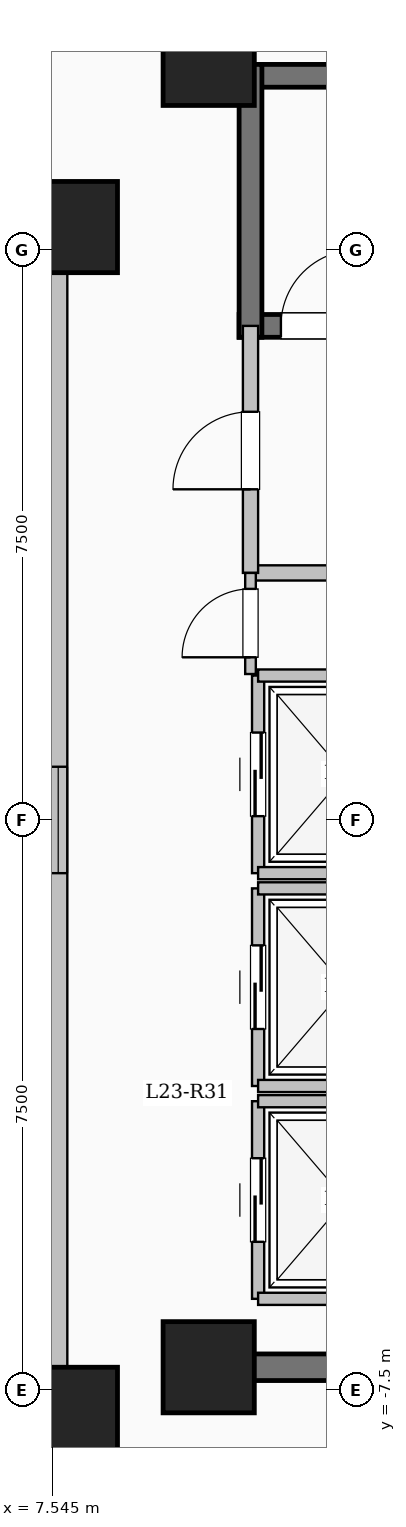
"""IFC4 building model, lengths in metres.
Left out: names, types, materials, properties, quantities, classifications, styles, units other than length and angle.
Written with IfcOpenShell. Run it as: python <this file> out.ifc"""

import sys

from ifc_helpers import new_model, si_unit, direction, frame, frame_2d, origin, origin_2d, place, context, subcontext, project, spatial, rectangle, extrude, element, fill, save


model = new_model("IFC4")
c1 = context("Model", 3, precision=1e-05, world=origin(), true_north=direction((0.0, 1.0)))
c2 = subcontext(c1, "Body", "Model", "MODEL_VIEW")
j1 = project(units=[si_unit("LENGTHUNIT", "METRE"), si_unit("PLANEANGLEUNIT", "RADIAN")], contexts=[c1])
p1 = place(None, origin())
s1 = spatial("IfcSite", under=j1, at=p1, CompositionType="ELEMENT")
p2 = place(p1, origin())
s2 = spatial("IfcBuilding", under=s1, at=p2, CompositionType="ELEMENT")
p3 = place(p2, frame((0.0, 0.0, 88.35)))
s3 = spatial("IfcBuildingStorey", under=s2, at=p3, CompositionType="ELEMENT", Elevation=88.35)
for number, where, z_axis, x_axis in (
    (1, (7.8, -7.8, 0.0), (0.0, 0.0, 1.0), (1.0, 0.0, 0.0)),
    (2, (7.8, 7.8, 0.0), (0.0, 0.0, 1.0), (1.0, 0.0, 0.0)),
    (3, (9.6, -7.2, 0.0), (0.0, 0.0, 1.0), (1.0, 0.0, 0.0)),
    (4, (9.6, 10.0, 0.0), (0.0, 0.0, 1.0), (1.0, 0.0, 0.0)),
):
    element("IfcColumn", number, at=place(p3, frame(where, z_axis=z_axis, x_axis=x_axis)), inside=s3, PredefinedType="COLUMN", context=c2, shape_type="SweptSolid", body=[
        extrude(rectangle(XDim=1.2, YDim=1.2, at=origin_2d()), origin(), (0.0, 0.0, 1.0), 3.35),
    ])
p4 = place(p3, frame((-7.62, -7.62, 0.0), z_axis=(0.0, 0.0, 1.0), x_axis=(1.0, 0.0, 0.0)))
e5 = element("IfcWall", 5, at=p4, inside=s3, PredefinedType="SOLIDWALL", context=c2, shape_type="SweptSolid", body=[
    extrude(rectangle(XDim=15.24, YDim=0.24, at=frame_2d((7.62, 0.0))), origin(), (0.0, 0.0, 1.0), 3.1),
])
p5 = place(p4, frame((6.92, 0.0, 0.95)))
e6 = element("IfcOpeningElement", 6, at=p5, cuts=e5, PredefinedType="OPENING", context=c2, shape_type="SweptSolid", body=[
    extrude(rectangle(XDim=1.4, YDim=1.5, at=frame_2d((0.7, 0.75))), frame((0.0, 0.13, 0.0), z_axis=(0.0, -1.0, 0.0), x_axis=(1.0, 0.0, 0.0)), (0.0, 0.0, 1.0), 0.26),
])
p6 = place(p3, frame((7.62, -7.62, 0.0), z_axis=(0.0, 0.0, 1.0), x_axis=(0.0, 1.0, 0.0)))
e7 = element("IfcWall", 7, at=p6, inside=s3, PredefinedType="SOLIDWALL", context=c2, shape_type="SweptSolid", body=[
    extrude(rectangle(XDim=15.24, YDim=0.24, at=frame_2d((7.62, 0.0))), origin(), (0.0, 0.0, 1.0), 3.1),
])
p7 = place(p6, frame((6.92, 0.0, 0.95)))
e8 = element("IfcOpeningElement", 8, at=p7, cuts=e7, PredefinedType="OPENING", context=c2, shape_type="SweptSolid", body=[
    extrude(rectangle(XDim=1.4, YDim=1.5, at=frame_2d((0.7, 0.75))), frame((0.0, 0.13, 0.0), z_axis=(0.0, -1.0, 0.0), x_axis=(1.0, 0.0, 0.0)), (0.0, 0.0, 1.0), 0.26),
])
p8 = place(p3, frame((7.62, 7.62, 0.0), z_axis=(0.0, 0.0, 1.0), x_axis=(-1.0, 0.0, 0.0)))
e9 = element("IfcWall", 9, at=p8, inside=s3, PredefinedType="SOLIDWALL", context=c2, shape_type="SweptSolid", body=[
    extrude(rectangle(XDim=15.24, YDim=0.24, at=frame_2d((7.62, 0.0))), origin(), (0.0, 0.0, 1.0), 3.1),
])
p9 = place(p8, frame((6.92, 0.0, 0.95)))
e10 = element("IfcOpeningElement", 10, at=p9, cuts=e9, PredefinedType="OPENING", context=c2, shape_type="SweptSolid", body=[
    extrude(rectangle(XDim=1.4, YDim=1.5, at=frame_2d((0.7, 0.75))), frame((0.0, 0.13, 0.0), z_axis=(0.0, -1.0, 0.0), x_axis=(1.0, 0.0, 0.0)), (0.0, 0.0, 1.0), 0.26),
])
p10 = place(p3, frame((10.0, 9.79, 0.0), z_axis=(0.0, 0.0, 1.0), x_axis=(1.0, 0.0, 0.0)))
e11 = element("IfcWall", 11, at=p10, inside=s3, PredefinedType="SHEAR", context=c2, shape_type="SweptSolid", body=[
    extrude(rectangle(XDim=8.0, YDim=0.3, at=frame_2d((4.0, 0.0))), origin(), (0.0, 0.0, 1.0), 3.35),
])
p11 = place(p3, frame((10.0, 6.5, 0.0), z_axis=(0.0, 0.0, 1.0), x_axis=(1.0, 0.0, 0.0)))
e12 = element("IfcWall", 12, at=p11, inside=s3, PredefinedType="SHEAR", context=c2, shape_type="SweptSolid", body=[
    extrude(rectangle(XDim=8.0, YDim=0.3, at=frame_2d((4.0, 0.0))), origin(), (0.0, 0.0, 1.0), 3.35),
])
p12 = place(p11, frame((0.55, 0.0, 0.0)))
e13 = element("IfcOpeningElement", 13, at=p12, cuts=e12, PredefinedType="OPENING", context=c2, shape_type="SweptSolid", body=[
    extrude(rectangle(XDim=1.0, YDim=2.15, at=frame_2d((0.5, 1.075))), frame((0.0, 0.16, 0.0), z_axis=(0.0, -1.0, 0.0), x_axis=(1.0, 0.0, 0.0)), (0.0, 0.0, 1.0), 0.32),
])
p13 = place(p3, frame((10.15, 6.35, 0.0), z_axis=(0.0, 0.0, 1.0), x_axis=(0.0, 1.0, 0.0)))
e14 = element("IfcWall", 14, at=p13, inside=s3, PredefinedType="SHEAR", context=c2, shape_type="SweptSolid", body=[
    extrude(rectangle(XDim=3.59, YDim=0.3, at=frame_2d((1.795, 0.0))), origin(), (0.0, 0.0, 1.0), 3.35),
])
p14 = place(p3, frame((10.15, 3.25, 0.0), z_axis=(0.0, 0.0, 1.0), x_axis=(1.0, 0.0, 0.0)))
e15 = element("IfcWall", 15, at=p14, inside=s3, PredefinedType="SOLIDWALL", context=c2, shape_type="SweptSolid", body=[
    extrude(rectangle(XDim=5.4, YDim=0.2, at=frame_2d((2.7, 0.0))), origin(), (0.0, 0.0, 1.0), 3.1),
])
p15 = place(p3, frame((10.15, 3.25, 0.0), z_axis=(0.0, 0.0, 1.0), x_axis=(0.0, 1.0, 0.0)))
e16 = element("IfcWall", 16, at=p15, inside=s3, PredefinedType="SOLIDWALL", context=c2, shape_type="SweptSolid", body=[
    extrude(rectangle(XDim=3.25, YDim=0.2, at=frame_2d((1.625, 0.0))), origin(), (0.0, 0.0, 1.0), 3.1),
])
p16 = place(p15, frame((1.1, 0.0, 0.0)))
e17 = element("IfcOpeningElement", 17, at=p16, cuts=e16, PredefinedType="OPENING", context=c2, shape_type="SweptSolid", body=[
    extrude(rectangle(XDim=1.02, YDim=2.15, at=frame_2d((0.51, 1.075))), frame((0.0, 0.11, 0.0), z_axis=(0.0, -1.0, 0.0), x_axis=(1.0, 0.0, 0.0)), (0.0, 0.0, 1.0), 0.22),
])
p17 = place(p3, frame((10.25, -6.3, 0.0), z_axis=(0.0, 0.0, 1.0), x_axis=(0.0, 1.0, 0.0)))
e18 = element("IfcWall", 18, at=p17, inside=s3, PredefinedType="SOLIDWALL", context=c2, shape_type="SweptSolid", body=[
    extrude(rectangle(XDim=2.6, YDim=0.16, at=frame_2d((1.3, 0.0))), origin(), (0.0, 0.0, 1.0), 3.1),
])
p18 = place(p17, frame((0.75, 0.0, 0.0)))
e19 = element("IfcOpeningElement", 19, at=p18, cuts=e18, PredefinedType="OPENING", context=c2, shape_type="SweptSolid", body=[
    extrude(rectangle(XDim=1.1, YDim=2.15, at=frame_2d((0.55, 1.075))), frame((0.0, 0.09, 0.0), z_axis=(0.0, -1.0, 0.0), x_axis=(1.0, 0.0, 0.0)), (0.0, 0.0, 1.0), 0.18),
])
for number, where, z_axis, x_axis in (
    (20, (10.25, -6.3, 0.0), (0.0, 0.0, 1.0), (1.0, 0.0, 0.0)),
    (21, (10.25, -3.7, 0.0), (0.0, 0.0, 1.0), (1.0, 0.0, 0.0)),
):
    element("IfcWall", number, at=place(p3, frame(where, z_axis=z_axis, x_axis=x_axis)), inside=s3, PredefinedType="SOLIDWALL", context=c2, shape_type="SweptSolid", body=[
        extrude(rectangle(XDim=2.3, YDim=0.16, at=frame_2d((1.15, 0.0))), origin(), (0.0, 0.0, 1.0), 3.1),
    ])
p19 = place(p3, frame((10.25, -3.5, 0.0), z_axis=(0.0, 0.0, 1.0), x_axis=(0.0, 1.0, 0.0)))
e22 = element("IfcWall", 22, at=p19, inside=s3, PredefinedType="SOLIDWALL", context=c2, shape_type="SweptSolid", body=[
    extrude(rectangle(XDim=2.6, YDim=0.16, at=frame_2d((1.3, 0.0))), origin(), (0.0, 0.0, 1.0), 3.1),
])
p20 = place(p19, frame((0.75, 0.0, 0.0)))
e23 = element("IfcOpeningElement", 23, at=p20, cuts=e22, PredefinedType="OPENING", context=c2, shape_type="SweptSolid", body=[
    extrude(rectangle(XDim=1.1, YDim=2.15, at=frame_2d((0.55, 1.075))), frame((0.0, 0.09, 0.0), z_axis=(0.0, -1.0, 0.0), x_axis=(1.0, 0.0, 0.0)), (0.0, 0.0, 1.0), 0.18),
])
for number, where, z_axis, x_axis in (
    (24, (10.25, -3.5, 0.0), (0.0, 0.0, 1.0), (1.0, 0.0, 0.0)),
    (25, (10.25, -0.9, 0.0), (0.0, 0.0, 1.0), (1.0, 0.0, 0.0)),
):
    element("IfcWall", number, at=place(p3, frame(where, z_axis=z_axis, x_axis=x_axis)), inside=s3, PredefinedType="SOLIDWALL", context=c2, shape_type="SweptSolid", body=[
        extrude(rectangle(XDim=2.3, YDim=0.16, at=frame_2d((1.15, 0.0))), origin(), (0.0, 0.0, 1.0), 3.1),
    ])
p21 = place(p3, frame((10.25, -0.7, 0.0), z_axis=(0.0, 0.0, 1.0), x_axis=(0.0, 1.0, 0.0)))
e26 = element("IfcWall", 26, at=p21, inside=s3, PredefinedType="SOLIDWALL", context=c2, shape_type="SweptSolid", body=[
    extrude(rectangle(XDim=2.6, YDim=0.16, at=frame_2d((1.3, 0.0))), origin(), (0.0, 0.0, 1.0), 3.1),
])
p22 = place(p21, frame((0.75, 0.0, 0.0)))
e27 = element("IfcOpeningElement", 27, at=p22, cuts=e26, PredefinedType="OPENING", context=c2, shape_type="SweptSolid", body=[
    extrude(rectangle(XDim=1.1, YDim=2.15, at=frame_2d((0.55, 1.075))), frame((0.0, 0.09, 0.0), z_axis=(0.0, -1.0, 0.0), x_axis=(1.0, 0.0, 0.0)), (0.0, 0.0, 1.0), 0.18),
])
for number, where, z_axis, x_axis in (
    (28, (10.25, -0.7, 0.0), (0.0, 0.0, 1.0), (1.0, 0.0, 0.0)),
    (29, (10.25, 1.9, 0.0), (0.0, 0.0, 1.0), (1.0, 0.0, 0.0)),
):
    element("IfcWall", number, at=place(p3, frame(where, z_axis=z_axis, x_axis=x_axis)), inside=s3, PredefinedType="SOLIDWALL", context=c2, shape_type="SweptSolid", body=[
        extrude(rectangle(XDim=2.3, YDim=0.16, at=frame_2d((1.15, 0.0))), origin(), (0.0, 0.0, 1.0), 3.1),
    ])
p23 = place(p3, frame((10.075, -7.2, 0.0), z_axis=(0.0, 0.0, 1.0), x_axis=(1.0, 0.0, 0.0)))
e30 = element("IfcWall", 30, at=p23, inside=s3, PredefinedType="SHEAR", context=c2, shape_type="SweptSolid", body=[
    extrude(rectangle(XDim=8.55, YDim=0.35, at=frame_2d((4.275, 0.0))), origin(), (0.0, 0.0, 1.0), 3.35),
])
p24 = place(p3, frame((10.15, 1.92, 0.0), z_axis=(0.0, 0.0, 1.0), x_axis=(0.0, 1.0, 0.0)))
e31 = element("IfcWall", 31, at=p24, inside=s3, PredefinedType="PARTITIONING", context=c2, shape_type="SweptSolid", body=[
    extrude(rectangle(XDim=1.33, YDim=0.14, at=frame_2d((0.665, 0.0))), origin(), (0.0, 0.0, 1.0), 3.1),
])
p25 = place(p24, frame((0.22, 0.0, 0.0)))
e32 = element("IfcOpeningElement", 32, at=p25, cuts=e31, PredefinedType="OPENING", context=c2, shape_type="SweptSolid", body=[
    extrude(rectangle(XDim=0.9, YDim=2.08, at=frame_2d((0.45, 1.04))), frame((0.0, 0.08, 0.0), z_axis=(0.0, -1.0, 0.0), x_axis=(1.0, 0.0, 0.0)), (0.0, 0.0, 1.0), 0.16),
])
p26 = place(p7, origin())
e33 = element("IfcWindow", 33, at=p26, inside=s3, PartitioningType="SINGLE_PANEL", PredefinedType="WINDOW", context=c2, shape_type="SweptSolid", body=[
    extrude(rectangle(XDim=1.4, YDim=1.5, at=frame_2d((0.7, 0.75))), frame((0.0, 0.03, 0.0), z_axis=(0.0, -1.0, 0.0), x_axis=(1.0, 0.0, 0.0)), (0.0, 0.0, 1.0), 0.06),
])
fill(e8, e33)
p27 = place(p12, origin())
e34 = element("IfcDoor", 34, at=p27, inside=s3, OperationType="SINGLE_SWING_RIGHT", PredefinedType="DOOR", context=c2, shape_type="SweptSolid", body=[
    extrude(rectangle(XDim=1.0, YDim=2.15, at=frame_2d((0.5, 1.075))), frame((0.0, 0.025, 0.0), z_axis=(0.0, -1.0, 0.0), x_axis=(1.0, 0.0, 0.0)), (0.0, 0.0, 1.0), 0.05),
])
fill(e13, e34)
p28 = place(p16, origin())
e35 = element("IfcDoor", 35, at=p28, inside=s3, OperationType="SINGLE_SWING_LEFT", PredefinedType="DOOR", context=c2, shape_type="SweptSolid", body=[
    extrude(rectangle(XDim=1.02, YDim=2.15, at=frame_2d((0.51, 1.075))), frame((0.0, 0.025, 0.0), z_axis=(0.0, -1.0, 0.0), x_axis=(1.0, 0.0, 0.0)), (0.0, 0.0, 1.0), 0.05),
])
fill(e17, e35)
p29 = place(p18, origin())
e36 = element("IfcDoor", 36, at=p29, inside=s3, OperationType="SLIDING_TO_LEFT", PredefinedType="DOOR", context=c2, shape_type="SweptSolid", body=[
    extrude(rectangle(XDim=1.1, YDim=2.15, at=frame_2d((0.55, 1.075))), frame((0.0, 0.025, 0.0), z_axis=(0.0, -1.0, 0.0), x_axis=(1.0, 0.0, 0.0)), (0.0, 0.0, 1.0), 0.05),
])
fill(e19, e36)
p30 = place(p20, origin())
e37 = element("IfcDoor", 37, at=p30, inside=s3, OperationType="SLIDING_TO_LEFT", PredefinedType="DOOR", context=c2, shape_type="SweptSolid", body=[
    extrude(rectangle(XDim=1.1, YDim=2.15, at=frame_2d((0.55, 1.075))), frame((0.0, 0.025, 0.0), z_axis=(0.0, -1.0, 0.0), x_axis=(1.0, 0.0, 0.0)), (0.0, 0.0, 1.0), 0.05),
])
fill(e23, e37)
p31 = place(p22, origin())
e38 = element("IfcDoor", 38, at=p31, inside=s3, OperationType="SLIDING_TO_LEFT", PredefinedType="DOOR", context=c2, shape_type="SweptSolid", body=[
    extrude(rectangle(XDim=1.1, YDim=2.15, at=frame_2d((0.55, 1.075))), frame((0.0, 0.025, 0.0), z_axis=(0.0, -1.0, 0.0), x_axis=(1.0, 0.0, 0.0)), (0.0, 0.0, 1.0), 0.05),
])
fill(e27, e38)
p32 = place(p25, origin())
e39 = element("IfcDoor", 39, at=p32, inside=s3, OperationType="SINGLE_SWING_LEFT", PredefinedType="DOOR", context=c2, shape_type="SweptSolid", body=[
    extrude(rectangle(XDim=0.9, YDim=2.08, at=frame_2d((0.45, 1.04))), frame((0.0, 0.025, 0.0), z_axis=(0.0, -1.0, 0.0), x_axis=(1.0, 0.0, 0.0)), (0.0, 0.0, 1.0), 0.05),
])
fill(e32, e39)
save(model, sys.argv[1])
